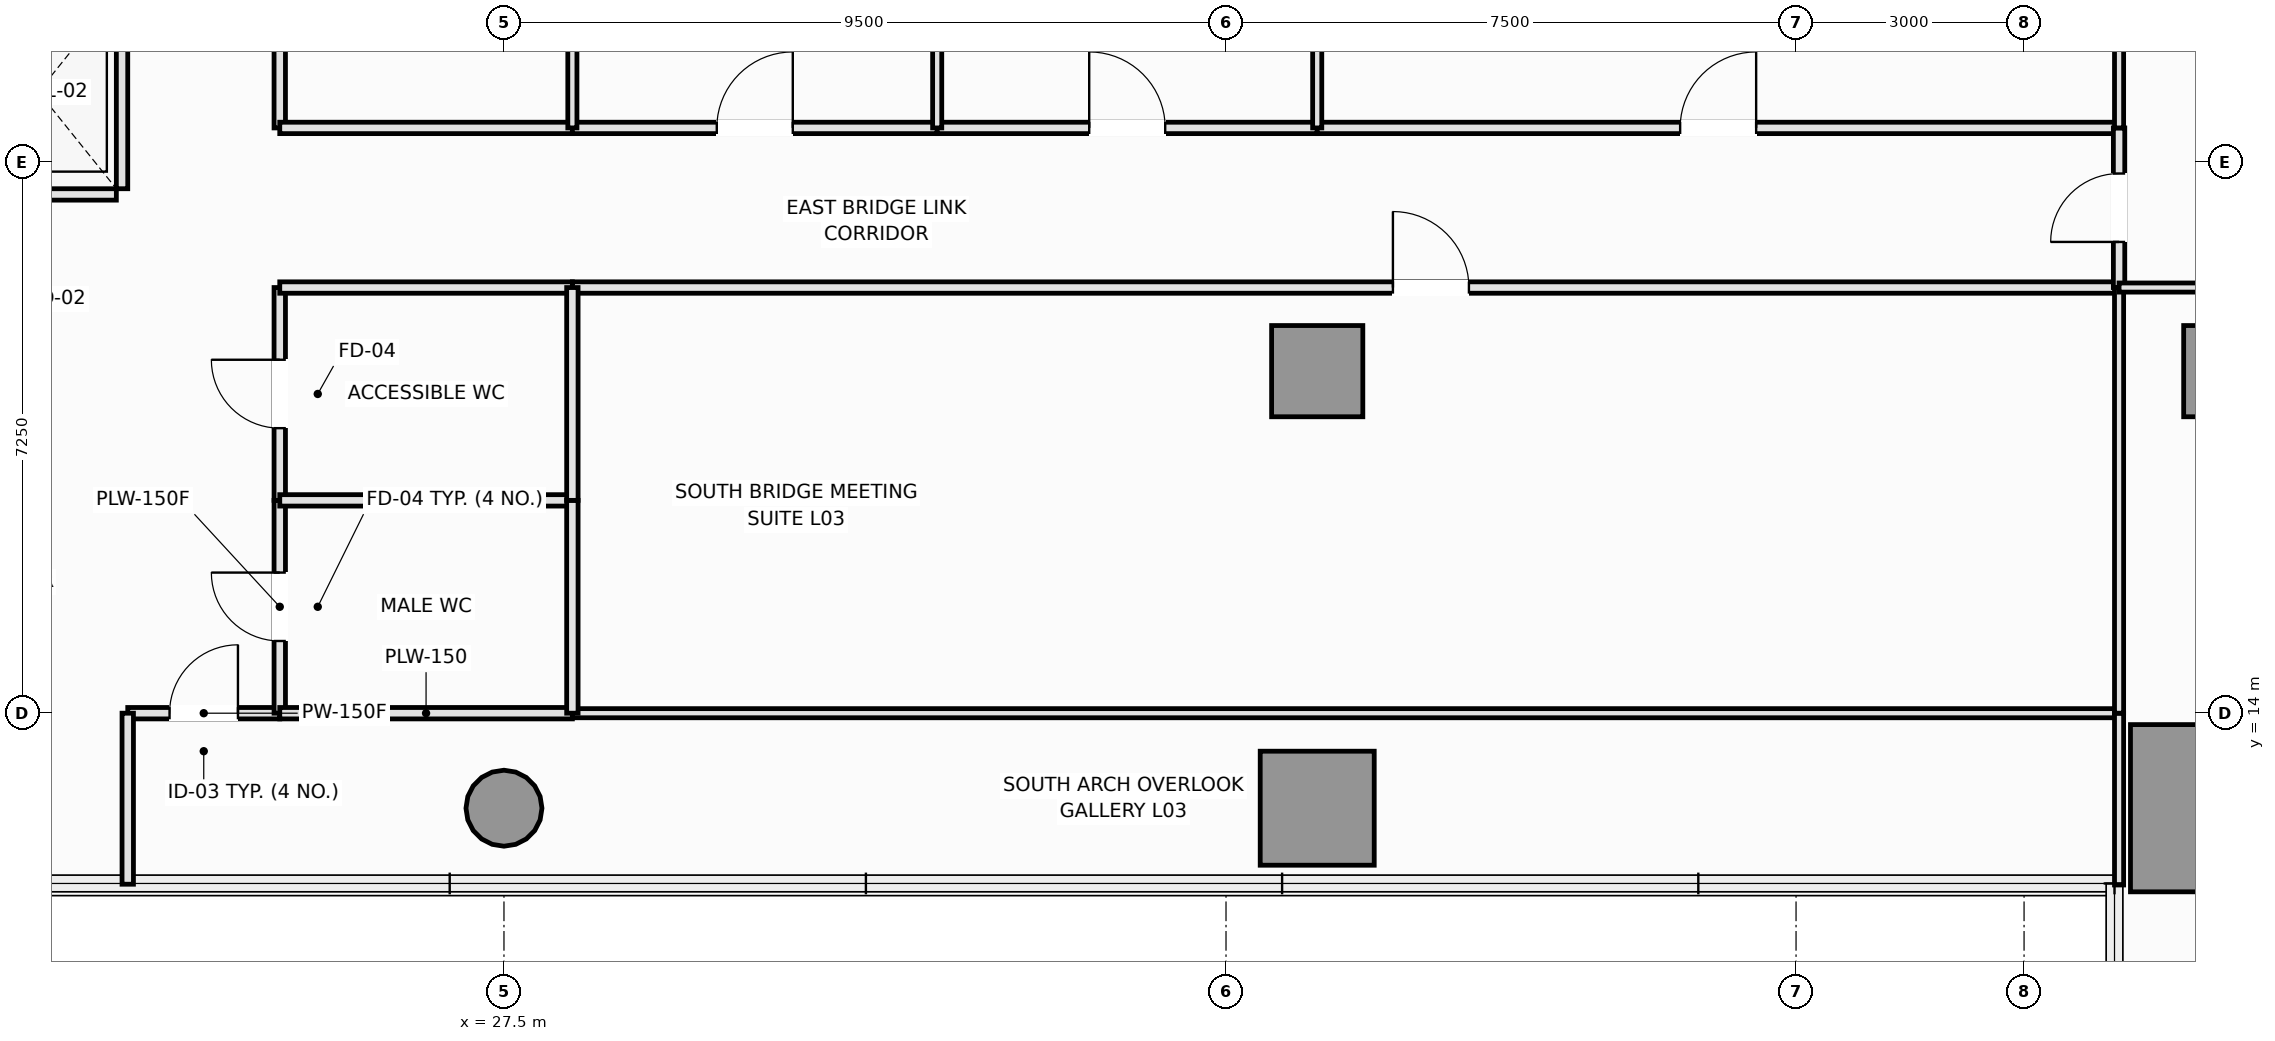
"""IFC4 building model, lengths in metres.
Left out: names, types, materials, properties, quantities, classifications, styles, units other than length and angle.
Written with IfcOpenShell. Run it as: python <this file> out.ifc"""

import sys

from ifc_helpers import new_model, si_unit, direction, frame, frame_2d, origin, origin_2d, place, context, subcontext, project, spatial, rectangle, circle, extrude, element, fill, save


model = new_model("IFC4")
c1 = context("Model", 3, precision=1e-05, world=origin(), true_north=direction((0.0, 1.0)))
c2 = subcontext(c1, "Body", "Model", "MODEL_VIEW")
j1 = project(units=[si_unit("LENGTHUNIT", "METRE"), si_unit("PLANEANGLEUNIT", "RADIAN")], contexts=[c1])
p1 = place(None, origin())
s1 = spatial("IfcSite", under=j1, at=p1, CompositionType="ELEMENT")
p2 = place(p1, origin())
s2 = spatial("IfcBuilding", under=s1, at=p2, CompositionType="ELEMENT")
p3 = place(p2, frame((0.0, 0.0, 15.6)))
s3 = spatial("IfcBuildingStorey", under=s2, at=p3, CompositionType="ELEMENT", Elevation=15.6)
p4 = place(p3, frame((38.2, 18.5, 0.0), z_axis=(0.0, 0.0, 1.0), x_axis=(1.0, 0.0, 0.0)))
e1 = element("IfcColumn", 1, at=p4, inside=s3, PredefinedType="COLUMN", context=c2, shape_type="SweptSolid", body=[
    extrude(rectangle(XDim=1.2, YDim=1.2, at=origin_2d()), origin(), (0.0, 0.0, 1.0), 4.8),
])
p5 = place(p3, frame((50.2, 12.75, 0.0), z_axis=(0.0, 0.0, 1.0), x_axis=(1.0, 0.0, 0.0)))
e2 = element("IfcColumn", 2, at=p5, inside=s3, PredefinedType="COLUMN", context=c2, shape_type="SweptSolid", body=[
    extrude(rectangle(XDim=2.6, YDim=2.2, at=origin_2d()), origin(), (0.0, 0.0, 1.0), 4.8),
])
p6 = place(p3, frame((50.2, 18.5, 0.0), z_axis=(0.0, 0.0, 1.0), x_axis=(1.0, 0.0, 0.0)))
e3 = element("IfcColumn", 3, at=p6, inside=s3, PredefinedType="COLUMN", context=c2, shape_type="SweptSolid", body=[
    extrude(rectangle(XDim=1.2, YDim=1.2, at=origin_2d()), origin(), (0.0, 0.0, 1.0), 4.8),
])
p7 = place(p3, frame((27.5, 12.75, 0.0), z_axis=(0.0, 0.0, 1.0), x_axis=(1.0, 0.0, 0.0)))
e4 = element("IfcColumn", 4, at=p7, inside=s3, PredefinedType="COLUMN", context=c2, shape_type="SweptSolid", body=[
    extrude(circle(Radius=0.5, at=origin_2d()), origin(), (0.0, 0.0, 1.0), 4.8),
])
p8 = place(p3, frame((38.2, 12.75, 0.8), z_axis=(0.0, 0.0, 1.0), x_axis=(1.0, 0.0, 0.0)))
e5 = element("IfcColumn", 5, at=p8, inside=s3, PredefinedType="COLUMN", context=c2, shape_type="SweptSolid", body=[
    extrude(rectangle(XDim=1.5, YDim=1.5, at=origin_2d()), origin(), (0.0, 0.0, 1.0), 4.0),
])
p9 = place(p3, frame((20.35, 20.825, 0.0), z_axis=(0.0, 0.0, 1.0), x_axis=(1.0, 0.0, 0.0)))
e6 = element("IfcWall", 6, at=p9, inside=s3, PredefinedType="PARTITIONING", context=c2, shape_type="SweptSolid", body=[
    extrude(rectangle(XDim=2.05, YDim=0.15, at=frame_2d((1.025, 0.0))), origin(), (0.0, 0.0, 1.0), 4.6),
])
p10 = place(p3, frame((22.475, 20.9, 0.0), z_axis=(0.0, 0.0, 1.0), x_axis=(0.0, 1.0, 0.0)))
e7 = element("IfcWall", 7, at=p10, inside=s3, PredefinedType="PARTITIONING", context=c2, shape_type="SweptSolid", body=[
    extrude(rectangle(XDim=2.55, YDim=0.15, at=frame_2d((1.275, 0.0))), origin(), (0.0, 0.0, 1.0), 4.6),
])
p11 = place(p3, frame((22.55, 14.0, 0.0), z_axis=(0.0, 0.0, 1.0), x_axis=(1.0, 0.0, 0.0)))
e8 = element("IfcWall", 8, at=p11, inside=s3, PredefinedType="PARTITIONING", context=c2, shape_type="SweptSolid", body=[
    extrude(rectangle(XDim=2.0, YDim=0.15, at=frame_2d((1.0, 0.0))), origin(), (0.0, 0.0, 1.0), 4.6),
])
p12 = place(p11, frame((0.55, 0.0, 0.0)))
e9 = element("IfcOpeningElement", 9, at=p12, cuts=e8, PredefinedType="OPENING", context=c2, shape_type="SweptSolid", body=[
    extrude(rectangle(XDim=0.9, YDim=2.1, at=frame_2d((0.45, 1.05))), frame((0.0, 0.085, 0.0), z_axis=(0.0, -1.0, 0.0), x_axis=(1.0, 0.0, 0.0)), (0.0, 0.0, 1.0), 0.17),
])
p13 = place(p3, frame((24.55, 14.0, 0.0), z_axis=(0.0, 0.0, 1.0), x_axis=(0.0, 1.0, 0.0)))
e10 = element("IfcWall", 10, at=p13, inside=s3, PredefinedType="PLUMBINGWALL", context=c2, shape_type="SweptSolid", body=[
    extrude(rectangle(XDim=2.8, YDim=0.15, at=frame_2d((1.4, 0.0))), origin(), (0.0, 0.0, 1.0), 4.6),
])
p14 = place(p13, frame((0.95, 0.0, 0.0)))
e11 = element("IfcOpeningElement", 11, at=p14, cuts=e10, PredefinedType="OPENING", context=c2, shape_type="SweptSolid", body=[
    extrude(rectangle(XDim=0.9, YDim=2.1, at=frame_2d((0.45, 1.05))), frame((0.0, 0.085, 0.0), z_axis=(0.0, -1.0, 0.0), x_axis=(1.0, 0.0, 0.0)), (0.0, 0.0, 1.0), 0.17),
])
p15 = place(p3, frame((24.55, 16.8, 0.0), z_axis=(0.0, 0.0, 1.0), x_axis=(0.0, 1.0, 0.0)))
e12 = element("IfcWall", 12, at=p15, inside=s3, PredefinedType="PLUMBINGWALL", context=c2, shape_type="SweptSolid", body=[
    extrude(rectangle(XDim=2.8, YDim=0.15, at=frame_2d((1.4, 0.0))), origin(), (0.0, 0.0, 1.0), 4.6),
])
p16 = place(p15, frame((0.95, 0.0, 0.0)))
e13 = element("IfcOpeningElement", 13, at=p16, cuts=e12, PredefinedType="OPENING", context=c2, shape_type="SweptSolid", body=[
    extrude(rectangle(XDim=0.9, YDim=2.1, at=frame_2d((0.45, 1.05))), frame((0.0, 0.085, 0.0), z_axis=(0.0, -1.0, 0.0), x_axis=(1.0, 0.0, 0.0)), (0.0, 0.0, 1.0), 0.17),
])
p17 = place(p3, frame((24.55, 21.7, 0.0), z_axis=(0.0, 0.0, 1.0), x_axis=(0.0, 1.0, 0.0)))
e14 = element("IfcWall", 14, at=p17, inside=s3, PredefinedType="PARTITIONING", context=c2, shape_type="SweptSolid", body=[
    extrude(rectangle(XDim=9.1, YDim=0.15, at=frame_2d((4.55, 0.0))), origin(), (0.0, 0.0, 1.0), 4.6),
])
p18 = place(p17, frame((4.05, 0.0, 0.0)))
e15 = element("IfcOpeningElement", 15, at=p18, cuts=e14, PredefinedType="OPENING", context=c2, shape_type="SweptSolid", body=[
    extrude(rectangle(XDim=1.0, YDim=2.15, at=frame_2d((0.5, 1.075))), frame((0.0, 0.085, 0.0), z_axis=(0.0, -1.0, 0.0), x_axis=(1.0, 0.0, 0.0)), (0.0, 0.0, 1.0), 0.17),
])
p19 = place(p3, frame((22.55, 11.75, 0.0), z_axis=(0.0, 0.0, 1.0), x_axis=(0.0, 1.0, 0.0)))
e16 = element("IfcWall", 16, at=p19, inside=s3, PredefinedType="PARTITIONING", context=c2, shape_type="SweptSolid", body=[
    extrude(rectangle(XDim=2.25, YDim=0.15, at=frame_2d((1.125, 0.0))), origin(), (0.0, 0.0, 1.0), 4.6),
])
p20 = place(p3, frame((24.55, 19.6, 0.0), z_axis=(0.0, 0.0, 1.0), x_axis=(1.0, 0.0, 0.0)))
e17 = element("IfcWall", 17, at=p20, inside=s3, PredefinedType="PLUMBINGWALL", context=c2, shape_type="SweptSolid", body=[
    extrude(rectangle(XDim=3.85, YDim=0.15, at=frame_2d((1.925, 0.0))), origin(), (0.0, 0.0, 1.0), 4.6),
])
p21 = place(p3, frame((28.4, 19.6, 0.0), z_axis=(0.0, 0.0, 1.0), x_axis=(1.0, 0.0, 0.0)))
e18 = element("IfcWall", 18, at=p21, inside=s3, PredefinedType="PARTITIONING", context=c2, shape_type="SweptSolid", body=[
    extrude(rectangle(XDim=20.35, YDim=0.15, at=frame_2d((10.175, 0.0))), origin(), (0.0, 0.0, 1.0), 4.6),
])
p22 = place(p21, frame((10.796, 0.0, 0.0)))
e19 = element("IfcOpeningElement", 19, at=p22, cuts=e18, PredefinedType="OPENING", context=c2, shape_type="SweptSolid", body=[
    extrude(rectangle(XDim=1.0, YDim=2.15, at=frame_2d((0.5, 1.075))), frame((0.0, 0.085, 0.0), z_axis=(0.0, -1.0, 0.0), x_axis=(1.0, 0.0, 0.0)), (0.0, 0.0, 1.0), 0.17),
])
p23 = place(p3, frame((24.55, 21.7, 0.0), z_axis=(0.0, 0.0, 1.0), x_axis=(1.0, 0.0, 0.0)))
e20 = element("IfcWall", 20, at=p23, inside=s3, PredefinedType="PARTITIONING", context=c2, shape_type="SweptSolid", body=[
    extrude(rectangle(XDim=3.85, YDim=0.15, at=frame_2d((1.925, 0.0))), origin(), (0.0, 0.0, 1.0), 4.6),
])
p24 = place(p3, frame((28.4, 21.7, 0.0), z_axis=(0.0, 0.0, 1.0), x_axis=(1.0, 0.0, 0.0)))
e21 = element("IfcWall", 21, at=p24, inside=s3, PredefinedType="PARTITIONING", context=c2, shape_type="SweptSolid", body=[
    extrude(rectangle(XDim=4.8, YDim=0.15, at=frame_2d((2.4, 0.0))), origin(), (0.0, 0.0, 1.0), 4.6),
])
p25 = place(p24, frame((1.9, 0.0, 0.0)))
e22 = element("IfcOpeningElement", 22, at=p25, cuts=e21, PredefinedType="OPENING", context=c2, shape_type="SweptSolid", body=[
    extrude(rectangle(XDim=1.0, YDim=2.15, at=frame_2d((0.5, 1.075))), frame((0.0, 0.085, 0.0), z_axis=(0.0, -1.0, 0.0), x_axis=(1.0, 0.0, 0.0)), (0.0, 0.0, 1.0), 0.17),
])
p26 = place(p3, frame((33.2, 21.7, 0.0), z_axis=(0.0, 0.0, 1.0), x_axis=(1.0, 0.0, 0.0)))
e23 = element("IfcWall", 23, at=p26, inside=s3, PredefinedType="PARTITIONING", context=c2, shape_type="SweptSolid", body=[
    extrude(rectangle(XDim=5.0, YDim=0.15, at=frame_2d((2.5, 0.0))), origin(), (0.0, 0.0, 1.0), 4.6),
])
p27 = place(p26, frame((2.0, 0.0, 0.0)))
e24 = element("IfcOpeningElement", 24, at=p27, cuts=e23, PredefinedType="OPENING", context=c2, shape_type="SweptSolid", body=[
    extrude(rectangle(XDim=1.0, YDim=2.15, at=frame_2d((0.5, 1.075))), frame((0.0, 0.085, 0.0), z_axis=(0.0, -1.0, 0.0), x_axis=(1.0, 0.0, 0.0)), (0.0, 0.0, 1.0), 0.17),
])
p28 = place(p3, frame((38.2, 21.7, 0.0), z_axis=(0.0, 0.0, 1.0), x_axis=(1.0, 0.0, 0.0)))
e25 = element("IfcWall", 25, at=p28, inside=s3, PredefinedType="PARTITIONING", context=c2, shape_type="SweptSolid", body=[
    extrude(rectangle(XDim=10.55, YDim=0.15, at=frame_2d((5.275, 0.0))), origin(), (0.0, 0.0, 1.0), 4.6),
])
p29 = place(p28, frame((4.775, 0.0, 0.0)))
e26 = element("IfcOpeningElement", 26, at=p29, cuts=e25, PredefinedType="OPENING", context=c2, shape_type="SweptSolid", body=[
    extrude(rectangle(XDim=1.0, YDim=2.15, at=frame_2d((0.5, 1.075))), frame((0.0, 0.085, 0.0), z_axis=(0.0, -1.0, 0.0), x_axis=(1.0, 0.0, 0.0)), (0.0, 0.0, 1.0), 0.17),
])
p30 = place(p3, frame((48.75, 19.6, 0.0), z_axis=(0.0, 0.0, 1.0), x_axis=(0.0, 1.0, 0.0)))
e27 = element("IfcWall", 27, at=p30, inside=s3, PredefinedType="PARTITIONING", context=c2, shape_type="SweptSolid", body=[
    extrude(rectangle(XDim=2.1, YDim=0.15, at=frame_2d((1.05, 0.0))), origin(), (0.0, 0.0, 1.0), 4.6),
])
p31 = place(p30, frame((0.6, 0.0, 0.0)))
e28 = element("IfcOpeningElement", 28, at=p31, cuts=e27, PredefinedType="OPENING", context=c2, shape_type="SweptSolid", body=[
    extrude(rectangle(XDim=0.9, YDim=2.1, at=frame_2d((0.45, 1.05))), frame((0.0, 0.085, 0.0), z_axis=(0.0, -1.0, 0.0), x_axis=(1.0, 0.0, 0.0)), (0.0, 0.0, 1.0), 0.17),
])
p32 = place(p3, frame((24.55, 14.0, 0.0), z_axis=(0.0, 0.0, 1.0), x_axis=(1.0, 0.0, 0.0)))
e29 = element("IfcWall", 29, at=p32, inside=s3, PredefinedType="PLUMBINGWALL", context=c2, shape_type="SweptSolid", body=[
    extrude(rectangle(XDim=3.85, YDim=0.15, at=frame_2d((1.925, 0.0))), origin(), (0.0, 0.0, 1.0), 4.6),
])
p33 = place(p3, frame((28.4, 14.0, 0.0), z_axis=(0.0, 0.0, 1.0), x_axis=(1.0, 0.0, 0.0)))
e30 = element("IfcWall", 30, at=p33, inside=s3, PredefinedType="PARTITIONING", context=c2, shape_type="SweptSolid", body=[
    extrude(rectangle(XDim=20.35, YDim=0.12, at=frame_2d((10.175, 0.0))), origin(), (0.0, 0.0, 1.0), 4.6),
])
p34 = place(p3, frame((48.75, 11.74, 0.0), z_axis=(0.0, 0.0, 1.0), x_axis=(0.0, 1.0, 0.0)))
e31 = element("IfcWall", 31, at=p34, inside=s3, PredefinedType="PARTITIONING", context=c2, shape_type="SweptSolid", body=[
    extrude(rectangle(XDim=2.26, YDim=0.12, at=frame_2d((1.13, 0.0))), origin(), (0.0, 0.0, 1.0), 4.0),
])
p35 = place(p3, frame((24.55, 16.8, 0.0), z_axis=(0.0, 0.0, 1.0), x_axis=(1.0, 0.0, 0.0)))
e32 = element("IfcWall", 32, at=p35, inside=s3, PredefinedType="PLUMBINGWALL", context=c2, shape_type="SweptSolid", body=[
    extrude(rectangle(XDim=3.85, YDim=0.15, at=frame_2d((1.925, 0.0))), origin(), (0.0, 0.0, 1.0), 4.6),
])
for number, where, z_axis, x_axis in (
    (33, (28.4, 14.0, 0.0), (0.0, 0.0, 1.0), (0.0, 1.0, 0.0)),
    (34, (28.4, 16.8, 0.0), (0.0, 0.0, 1.0), (0.0, 1.0, 0.0)),
):
    element("IfcWall", number, at=place(p3, frame(where, z_axis=z_axis, x_axis=x_axis)), inside=s3, PredefinedType="PLUMBINGWALL", context=c2, shape_type="SweptSolid", body=[
        extrude(rectangle(XDim=2.8, YDim=0.15, at=frame_2d((1.4, 0.0))), origin(), (0.0, 0.0, 1.0), 4.6),
    ])
p36 = place(p3, frame((48.75, 14.0, 0.0), z_axis=(0.0, 0.0, 1.0), x_axis=(0.0, 1.0, 0.0)))
e35 = element("IfcWall", 35, at=p36, inside=s3, PredefinedType="PARTITIONING", context=c2, shape_type="SweptSolid", body=[
    extrude(rectangle(XDim=5.6, YDim=0.12, at=frame_2d((2.8, 0.0))), origin(), (0.0, 0.0, 1.0), 4.6),
])
p37 = place(p3, frame((28.4, 21.7, 0.0), z_axis=(0.0, 0.0, 1.0), x_axis=(0.0, 1.0, 0.0)))
e36 = element("IfcWall", 36, at=p37, inside=s3, PredefinedType="PARTITIONING", context=c2, shape_type="SweptSolid", body=[
    extrude(rectangle(XDim=9.1, YDim=0.12, at=frame_2d((4.55, 0.0))), origin(), (0.0, 0.0, 1.0), 4.6),
])
p38 = place(p3, frame((33.2, 21.7, 0.0), z_axis=(0.0, 0.0, 1.0), x_axis=(0.0, 1.0, 0.0)))
e37 = element("IfcWall", 37, at=p38, inside=s3, PredefinedType="PARTITIONING", context=c2, shape_type="SweptSolid", body=[
    extrude(rectangle(XDim=14.8, YDim=0.12, at=frame_2d((7.4, 0.0))), origin(), (0.0, 0.0, 1.0), 4.6),
])
p39 = place(p3, frame((38.2, 21.7, 0.0), z_axis=(0.0, 0.0, 1.0), x_axis=(0.0, 1.0, 0.0)))
e38 = element("IfcWall", 38, at=p39, inside=s3, PredefinedType="PARTITIONING", context=c2, shape_type="SweptSolid", body=[
    extrude(rectangle(XDim=14.8, YDim=0.12, at=frame_2d((7.4, 0.0))), origin(), (0.0, 0.0, 1.0), 4.0),
])
p40 = place(p3, frame((48.75, 21.7, 0.0), z_axis=(0.0, 0.0, 1.0), x_axis=(0.0, 1.0, 0.0)))
e39 = element("IfcWall", 39, at=p40, inside=s3, PredefinedType="PARTITIONING", context=c2, shape_type="SweptSolid", body=[
    extrude(rectangle(XDim=14.8, YDim=0.12, at=frame_2d((7.4, 0.0))), origin(), (0.0, 0.0, 1.0), 4.6),
])
p41 = place(p3, frame((48.75, 19.6, 0.0), z_axis=(0.0, 0.0, 1.0), x_axis=(1.0, 0.0, 0.0)))
e40 = element("IfcWall", 40, at=p41, inside=s3, PredefinedType="PARTITIONING", context=c2, shape_type="SweptSolid", body=[
    extrude(rectangle(XDim=9.05, YDim=0.12, at=frame_2d((4.525, 0.0))), origin(), (0.0, 0.0, 1.0), 4.6),
])
p42 = place(p41, frame((4.025, 0.0, 0.0)))
e41 = element("IfcOpeningElement", 41, at=p42, cuts=e40, PredefinedType="OPENING", context=c2, shape_type="SweptSolid", body=[
    extrude(rectangle(XDim=1.0, YDim=2.15, at=frame_2d((0.5, 1.075))), frame((0.0, 0.07, 0.0), z_axis=(0.0, -1.0, 0.0), x_axis=(1.0, 0.0, 0.0)), (0.0, 0.0, 1.0), 0.14),
])
p43 = place(p12, origin())
e42 = element("IfcDoor", 42, at=p43, inside=s3, OperationType="SINGLE_SWING_RIGHT", PredefinedType="DOOR", context=c2, shape_type="SweptSolid", body=[
    extrude(rectangle(XDim=0.9, YDim=2.1, at=frame_2d((0.45, 1.05))), frame((0.0, 0.025, 0.0), z_axis=(0.0, -1.0, 0.0), x_axis=(1.0, 0.0, 0.0)), (0.0, 0.0, 1.0), 0.05),
])
fill(e9, e42)
p44 = place(p14, origin())
e43 = element("IfcDoor", 43, at=p44, inside=s3, OperationType="SINGLE_SWING_RIGHT", PredefinedType="DOOR", context=c2, shape_type="SweptSolid", body=[
    extrude(rectangle(XDim=0.9, YDim=2.1, at=frame_2d((0.45, 1.05))), frame((0.0, 0.025, 0.0), z_axis=(0.0, -1.0, 0.0), x_axis=(1.0, 0.0, 0.0)), (0.0, 0.0, 1.0), 0.05),
])
fill(e11, e43)
p45 = place(p16, origin())
e44 = element("IfcDoor", 44, at=p45, inside=s3, OperationType="SINGLE_SWING_RIGHT", PredefinedType="DOOR", context=c2, shape_type="SweptSolid", body=[
    extrude(rectangle(XDim=0.9, YDim=2.1, at=frame_2d((0.45, 1.05))), frame((0.0, 0.025, 0.0), z_axis=(0.0, -1.0, 0.0), x_axis=(1.0, 0.0, 0.0)), (0.0, 0.0, 1.0), 0.05),
])
fill(e13, e44)
p46 = place(p22, origin())
e45 = element("IfcDoor", 45, at=p46, inside=s3, OperationType="SINGLE_SWING_LEFT", PredefinedType="DOOR", context=c2, shape_type="SweptSolid", body=[
    extrude(rectangle(XDim=1.0, YDim=2.15, at=frame_2d((0.5, 1.075))), frame((0.0, 0.025, 0.0), z_axis=(0.0, -1.0, 0.0), x_axis=(1.0, 0.0, 0.0)), (0.0, 0.0, 1.0), 0.05),
])
fill(e19, e45)
p47 = place(p25, origin())
e46 = element("IfcDoor", 46, at=p47, inside=s3, OperationType="SINGLE_SWING_RIGHT", PredefinedType="DOOR", context=c2, shape_type="SweptSolid", body=[
    extrude(rectangle(XDim=1.0, YDim=2.15, at=frame_2d((0.5, 1.075))), frame((0.0, 0.025, 0.0), z_axis=(0.0, -1.0, 0.0), x_axis=(1.0, 0.0, 0.0)), (0.0, 0.0, 1.0), 0.05),
])
fill(e22, e46)
p48 = place(p27, origin())
e47 = element("IfcDoor", 47, at=p48, inside=s3, OperationType="SINGLE_SWING_LEFT", PredefinedType="DOOR", context=c2, shape_type="SweptSolid", body=[
    extrude(rectangle(XDim=1.0, YDim=2.15, at=frame_2d((0.5, 1.075))), frame((0.0, 0.025, 0.0), z_axis=(0.0, -1.0, 0.0), x_axis=(1.0, 0.0, 0.0)), (0.0, 0.0, 1.0), 0.05),
])
fill(e24, e47)
p49 = place(p29, origin())
e48 = element("IfcDoor", 48, at=p49, inside=s3, OperationType="SINGLE_SWING_RIGHT", PredefinedType="DOOR", context=c2, shape_type="SweptSolid", body=[
    extrude(rectangle(XDim=1.0, YDim=2.15, at=frame_2d((0.5, 1.075))), frame((0.0, 0.025, 0.0), z_axis=(0.0, -1.0, 0.0), x_axis=(1.0, 0.0, 0.0)), (0.0, 0.0, 1.0), 0.05),
])
fill(e26, e48)
p50 = place(p31, origin())
e49 = element("IfcDoor", 49, at=p50, inside=s3, OperationType="SINGLE_SWING_LEFT", PredefinedType="DOOR", context=c2, shape_type="SweptSolid", body=[
    extrude(rectangle(XDim=0.9, YDim=2.1, at=frame_2d((0.45, 1.05))), frame((0.0, 0.025, 0.0), z_axis=(0.0, -1.0, 0.0), x_axis=(1.0, 0.0, 0.0)), (0.0, 0.0, 1.0), 0.05),
])
fill(e28, e49)
save(model, sys.argv[1])
